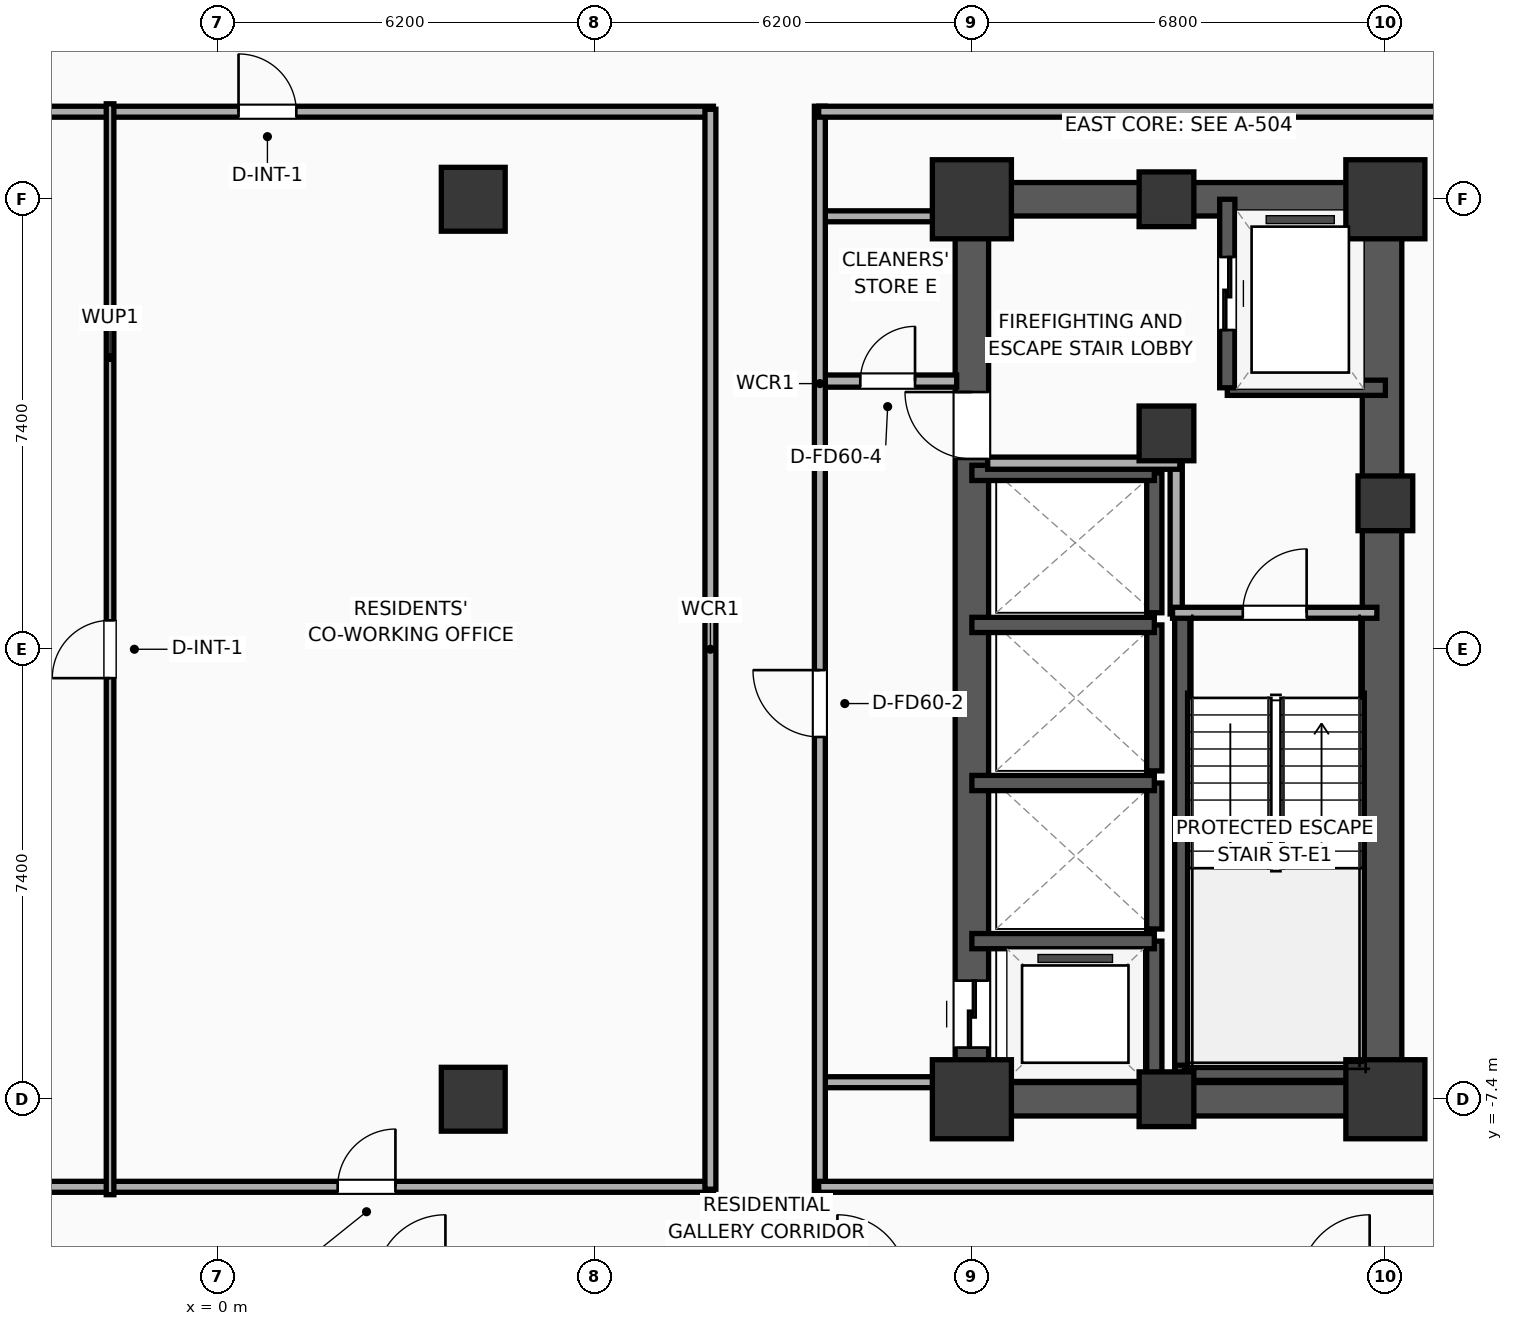
"""IFC4 building model, lengths in metres.
Left out: names, types, materials, properties, quantities, classifications, styles, units other than length and angle.
Written with IfcOpenShell. Run it as: python <this file> out.ifc"""

import sys

from ifc_helpers import new_model, si_unit, direction, frame, frame_2d, origin, origin_2d, place, context, subcontext, project, spatial, rectangle, extrude, element, fill, save


model = new_model("IFC4")
c1 = context("Model", 3, precision=1e-05, world=origin(), true_north=direction((0.0, 1.0)))
c2 = subcontext(c1, "Body", "Model", "MODEL_VIEW")
j1 = project(units=[si_unit("LENGTHUNIT", "METRE"), si_unit("PLANEANGLEUNIT", "RADIAN")], contexts=[c1])
p1 = place(None, origin())
s1 = spatial("IfcSite", under=j1, at=p1, CompositionType="ELEMENT")
p2 = place(p1, origin())
s2 = spatial("IfcBuilding", under=s1, at=p2, CompositionType="ELEMENT")
p3 = place(p2, frame((0.0, 0.0, 93.6)))
s3 = spatial("IfcBuildingStorey", under=s2, at=p3, CompositionType="ELEMENT", Elevation=93.6)
p4 = place(p3, frame((12.4, -7.4, 0.0), z_axis=(0.0, 0.0, 1.0), x_axis=(1.0, 0.0, 0.0)))
e1 = element("IfcColumn", 1, at=p4, inside=s3, PredefinedType="COLUMN", context=c2, shape_type="SweptSolid", body=[
    extrude(rectangle(XDim=1.3, YDim=1.3, at=origin_2d()), origin(), (0.0, 0.0, 1.0), 3.9),
])
p5 = place(p3, frame((15.6, 3.55, 0.0), z_axis=(0.0, 0.0, 1.0), x_axis=(1.0, 0.0, 0.0)))
e2 = element("IfcColumn", 2, at=p5, inside=s3, PredefinedType="COLUMN", context=c2, shape_type="SweptSolid", body=[
    extrude(rectangle(XDim=0.9, YDim=0.9, at=origin_2d()), origin(), (0.0, 0.0, 1.0), 3.9),
])
p6 = place(p3, frame((12.4, 7.4, 0.0), z_axis=(0.0, 0.0, 1.0), x_axis=(1.0, 0.0, 0.0)))
e3 = element("IfcColumn", 3, at=p6, inside=s3, PredefinedType="COLUMN", context=c2, shape_type="SweptSolid", body=[
    extrude(rectangle(XDim=1.3, YDim=1.3, at=origin_2d()), origin(), (0.0, 0.0, 1.0), 3.9),
])
for number, where, z_axis, x_axis in (
    (4, (15.6, -7.4, 0.0), (0.0, 0.0, 1.0), (1.0, 0.0, 0.0)),
    (5, (15.6, 7.4, 0.0), (0.0, 0.0, 1.0), (1.0, 0.0, 0.0)),
):
    element("IfcColumn", number, at=place(p3, frame(where, z_axis=z_axis, x_axis=x_axis)), inside=s3, PredefinedType="COLUMN", context=c2, shape_type="SweptSolid", body=[
        extrude(rectangle(XDim=0.9, YDim=0.9, at=origin_2d()), origin(), (0.0, 0.0, 1.0), 3.9),
    ])
p7 = place(p3, frame((19.2, -7.4, 0.0), z_axis=(0.0, 0.0, 1.0), x_axis=(1.0, 0.0, 0.0)))
e6 = element("IfcColumn", 6, at=p7, inside=s3, PredefinedType="COLUMN", context=c2, shape_type="SweptSolid", body=[
    extrude(rectangle(XDim=1.3, YDim=1.3, at=origin_2d()), origin(), (0.0, 0.0, 1.0), 3.9),
])
p8 = place(p3, frame((19.2, 2.4, 0.0), z_axis=(0.0, 0.0, 1.0), x_axis=(1.0, 0.0, 0.0)))
e7 = element("IfcColumn", 7, at=p8, inside=s3, PredefinedType="COLUMN", context=c2, shape_type="SweptSolid", body=[
    extrude(rectangle(XDim=0.9, YDim=0.9, at=origin_2d()), origin(), (0.0, 0.0, 1.0), 3.9),
])
p9 = place(p3, frame((19.2, 7.4, 0.0), z_axis=(0.0, 0.0, 1.0), x_axis=(1.0, 0.0, 0.0)))
e8 = element("IfcColumn", 8, at=p9, inside=s3, PredefinedType="COLUMN", context=c2, shape_type="SweptSolid", body=[
    extrude(rectangle(XDim=1.3, YDim=1.3, at=origin_2d()), origin(), (0.0, 0.0, 1.0), 3.9),
])
for number, where, z_axis, x_axis in (
    (9, (12.125, -7.4, 0.0), (0.0, 0.0, 1.0), (1.0, 0.0, 0.0)),
    (10, (12.125, 7.4, 0.0), (0.0, 0.0, 1.0), (1.0, 0.0, 0.0)),
):
    element("IfcWall", number, at=place(p3, frame(where, z_axis=z_axis, x_axis=x_axis)), inside=s3, PredefinedType="SHEAR", context=c2, shape_type="SweptSolid", body=[
        extrude(rectangle(XDim=7.35, YDim=0.55, at=frame_2d((3.675, 0.0))), origin(), (0.0, 0.0, 1.0), 3.65),
    ])
p10 = place(p3, frame((12.4, -7.4, 0.0), z_axis=(0.0, 0.0, 1.0), x_axis=(0.0, 1.0, 0.0)))
e11 = element("IfcWall", 11, at=p10, inside=s3, PredefinedType="SHEAR", context=c2, shape_type="SweptSolid", body=[
    extrude(rectangle(XDim=14.8, YDim=0.55, at=frame_2d((7.4, 0.0))), origin(), (0.0, 0.0, 1.0), 3.65),
])
p11 = place(p10, frame((0.85, 0.0, 0.0)))
e12 = element("IfcOpeningElement", 12, at=p11, cuts=e11, PredefinedType="OPENING", context=c2, shape_type="SweptSolid", body=[
    extrude(rectangle(XDim=1.1, YDim=2.05, at=frame_2d((0.55, 1.025))), frame((0.0, 0.285, 0.0), z_axis=(0.0, -1.0, 0.0), x_axis=(1.0, 0.0, 0.0)), (0.0, 0.0, 1.0), 0.57),
])
p12 = place(p10, frame((10.53, 0.0, 0.0)))
e13 = element("IfcOpeningElement", 13, at=p12, cuts=e11, PredefinedType="OPENING", context=c2, shape_type="SweptSolid", body=[
    extrude(rectangle(XDim=1.1, YDim=2.05, at=frame_2d((0.55, 1.025))), frame((0.0, 0.285, 0.0), z_axis=(0.0, -1.0, 0.0), x_axis=(1.0, 0.0, 0.0)), (0.0, 0.0, 1.0), 0.57),
])
p13 = place(p3, frame((19.145, -7.4, 0.0), z_axis=(0.0, 0.0, 1.0), x_axis=(0.0, 1.0, 0.0)))
e14 = element("IfcWall", 14, at=p13, inside=s3, PredefinedType="SHEAR", context=c2, shape_type="SweptSolid", body=[
    extrude(rectangle(XDim=14.8, YDim=0.65, at=frame_2d((7.4, 0.0))), origin(), (0.0, 0.0, 1.0), 3.65),
])
p14 = place(p3, frame((15.86, -7.085, 0.0), z_axis=(0.0, 0.0, 1.0), x_axis=(0.0, 1.0, 0.0)))
e15 = element("IfcWall", 15, at=p14, inside=s3, PredefinedType="SOLIDWALL", context=c2, shape_type="SweptSolid", body=[
    extrude(rectangle(XDim=7.685, YDim=0.25, at=frame_2d((3.843, 0.0))), origin(), (0.0, 0.0, 1.0), 3.65),
])
p15 = place(p3, frame((15.74, -6.965, 0.0), z_axis=(0.0, 0.0, 1.0), x_axis=(1.0, 0.0, 0.0)))
e16 = element("IfcWall", 16, at=p15, inside=s3, PredefinedType="SOLIDWALL", context=c2, shape_type="SweptSolid", body=[
    extrude(rectangle(XDim=3.46, YDim=0.25, at=frame_2d((1.73, 0.0))), origin(), (0.0, 0.0, 1.0), 3.65),
])
for number, where, z_axis, x_axis in (
    (17, (4.2, -7.4, 0.0), (0.0, 0.0, 1.0), (1.0, 0.0, 0.0)),
    (18, (4.2, 7.4, 0.0), (0.0, 0.0, 1.0), (1.0, 0.0, 0.0)),
):
    element("IfcColumn", number, at=place(p3, frame(where, z_axis=z_axis, x_axis=x_axis)), inside=s3, PredefinedType="COLUMN", context=c2, shape_type="SweptSolid", body=[
        extrude(rectangle(XDim=1.05, YDim=1.05, at=origin_2d()), origin(), (0.0, 0.0, 1.0), 3.9),
    ])
p16 = place(p3, frame((16.6, 4.3, 0.0), z_axis=(0.0, 0.0, 1.0), x_axis=(1.0, 0.0, 0.0)))
e19 = element("IfcWall", 19, at=p16, inside=s3, PredefinedType="SOLIDWALL", context=c2, shape_type="SweptSolid", body=[
    extrude(rectangle(XDim=2.6, YDim=0.25, at=frame_2d((1.3, 0.0))), origin(), (0.0, 0.0, 1.0), 3.65),
])
p17 = place(p3, frame((16.6, 7.4, 0.0), z_axis=(0.0, 0.0, 1.0), x_axis=(0.0, -1.0, 0.0)))
e20 = element("IfcWall", 20, at=p17, inside=s3, PredefinedType="SOLIDWALL", context=c2, shape_type="SweptSolid", body=[
    extrude(rectangle(XDim=3.1, YDim=0.25, at=frame_2d((1.55, 0.0))), origin(), (0.0, 0.0, 1.0), 3.65),
])
p18 = place(p17, frame((0.95, 0.0, 0.0)))
e21 = element("IfcOpeningElement", 21, at=p18, cuts=e20, PredefinedType="OPENING", context=c2, shape_type="SweptSolid", body=[
    extrude(rectangle(XDim=1.2, YDim=2.05, at=frame_2d((0.6, 1.025))), frame((0.0, 0.135, 0.0), z_axis=(0.0, -1.0, 0.0), x_axis=(1.0, 0.0, 0.0)), (0.0, 0.0, 1.0), 0.27),
])
p19 = place(p3, frame((15.4, -7.4, 0.0), z_axis=(0.0, 0.0, 1.0), x_axis=(0.0, 1.0, 0.0)))
e22 = element("IfcWall", 22, at=p19, inside=s3, PredefinedType="SOLIDWALL", context=c2, shape_type="SweptSolid", body=[
    extrude(rectangle(XDim=2.6, YDim=0.25, at=frame_2d((1.3, 0.0))), origin(), (0.0, 0.0, 1.0), 3.65),
])
p20 = place(p3, frame((15.4, -4.8, 0.0), z_axis=(0.0, 0.0, 1.0), x_axis=(-1.0, 0.0, 0.0)))
e23 = element("IfcWall", 23, at=p20, inside=s3, PredefinedType="SOLIDWALL", context=c2, shape_type="SweptSolid", body=[
    extrude(rectangle(XDim=3.0, YDim=0.25, at=frame_2d((1.5, 0.0))), origin(), (0.0, 0.0, 1.0), 3.65),
])
p21 = place(p3, frame((15.4, -4.6, 0.0), z_axis=(0.0, 0.0, 1.0), x_axis=(0.0, 1.0, 0.0)))
e24 = element("IfcWall", 24, at=p21, inside=s3, PredefinedType="SOLIDWALL", context=c2, shape_type="SweptSolid", body=[
    extrude(rectangle(XDim=2.4, YDim=0.25, at=frame_2d((1.2, 0.0))), origin(), (0.0, 0.0, 1.0), 3.65),
])
p22 = place(p3, frame((15.4, -2.2, 0.0), z_axis=(0.0, 0.0, 1.0), x_axis=(-1.0, 0.0, 0.0)))
e25 = element("IfcWall", 25, at=p22, inside=s3, PredefinedType="SOLIDWALL", context=c2, shape_type="SweptSolid", body=[
    extrude(rectangle(XDim=3.0, YDim=0.25, at=frame_2d((1.5, 0.0))), origin(), (0.0, 0.0, 1.0), 3.65),
])
p23 = place(p3, frame((15.4, -2.0, 0.0), z_axis=(0.0, 0.0, 1.0), x_axis=(0.0, 1.0, 0.0)))
e26 = element("IfcWall", 26, at=p23, inside=s3, PredefinedType="SOLIDWALL", context=c2, shape_type="SweptSolid", body=[
    extrude(rectangle(XDim=2.4, YDim=0.25, at=frame_2d((1.2, 0.0))), origin(), (0.0, 0.0, 1.0), 3.65),
])
p24 = place(p3, frame((15.4, 0.4, 0.0), z_axis=(0.0, 0.0, 1.0), x_axis=(-1.0, 0.0, 0.0)))
e27 = element("IfcWall", 27, at=p24, inside=s3, PredefinedType="SOLIDWALL", context=c2, shape_type="SweptSolid", body=[
    extrude(rectangle(XDim=3.0, YDim=0.25, at=frame_2d((1.5, 0.0))), origin(), (0.0, 0.0, 1.0), 3.65),
])
p25 = place(p3, frame((15.4, 0.6, 0.0), z_axis=(0.0, 0.0, 1.0), x_axis=(0.0, 1.0, 0.0)))
e28 = element("IfcWall", 28, at=p25, inside=s3, PredefinedType="SOLIDWALL", context=c2, shape_type="SweptSolid", body=[
    extrude(rectangle(XDim=2.3, YDim=0.25, at=frame_2d((1.15, 0.0))), origin(), (0.0, 0.0, 1.0), 3.65),
])
p26 = place(p3, frame((15.4, 2.9, 0.0), z_axis=(0.0, 0.0, 1.0), x_axis=(-1.0, 0.0, 0.0)))
e29 = element("IfcWall", 29, at=p26, inside=s3, PredefinedType="SOLIDWALL", context=c2, shape_type="SweptSolid", body=[
    extrude(rectangle(XDim=3.0, YDim=0.25, at=frame_2d((1.5, 0.0))), origin(), (0.0, 0.0, 1.0), 3.65),
])
p27 = place(p3, frame((15.76, 0.58, 0.0), z_axis=(0.0, 0.0, 1.0), x_axis=(0.0, 1.0, 0.0)))
e30 = element("IfcWall", 30, at=p27, inside=s3, PredefinedType="PARTITIONING", context=c2, shape_type="SweptSolid", body=[
    extrude(rectangle(XDim=2.52, YDim=0.2, at=frame_2d((1.26, 0.0))), origin(), (0.0, 0.0, 1.0), 3.65),
])
p28 = place(p3, frame((12.66, 3.06, 0.0), z_axis=(0.0, 0.0, 1.0), x_axis=(1.0, 0.0, 0.0)))
e31 = element("IfcWall", 31, at=p28, inside=s3, PredefinedType="PARTITIONING", context=c2, shape_type="SweptSolid", body=[
    extrude(rectangle(XDim=3.16, YDim=0.2, at=frame_2d((1.58, 0.0))), origin(), (0.0, 0.0, 1.0), 3.65),
])
p29 = place(p3, frame((15.7, 0.6, 0.0), z_axis=(0.0, 0.0, 1.0), x_axis=(1.0, 0.0, 0.0)))
e32 = element("IfcWall", 32, at=p29, inside=s3, PredefinedType="PARTITIONING", context=c2, shape_type="SweptSolid", body=[
    extrude(rectangle(XDim=3.36, YDim=0.18, at=frame_2d((1.68, 0.0))), origin(), (0.0, 0.0, 1.0), 3.65),
])
p30 = place(p29, frame((1.155, 0.0, 0.0)))
e33 = element("IfcOpeningElement", 33, at=p30, cuts=e32, PredefinedType="OPENING", context=c2, shape_type="SweptSolid", body=[
    extrude(rectangle(XDim=1.05, YDim=2.05, at=frame_2d((0.525, 1.025))), frame((0.0, 0.1, 0.0), z_axis=(0.0, -1.0, 0.0), x_axis=(1.0, 0.0, 0.0)), (0.0, 0.0, 1.0), 0.2),
])
p31 = place(p3, frame((9.88, 4.41, 0.0), z_axis=(0.0, 0.0, 1.0), x_axis=(1.0, 0.0, 0.0)))
e34 = element("IfcWall", 34, at=p31, inside=s3, PredefinedType="PARTITIONING", context=c2, shape_type="SweptSolid", body=[
    extrude(rectangle(XDim=2.27, YDim=0.2, at=frame_2d((1.135, 0.0))), origin(), (0.0, 0.0, 1.0), 3.65),
])
p32 = place(p31, frame((0.685, 0.0, 0.0)))
e35 = element("IfcOpeningElement", 35, at=p32, cuts=e34, PredefinedType="OPENING", context=c2, shape_type="SweptSolid", body=[
    extrude(rectangle(XDim=0.9, YDim=2.05, at=frame_2d((0.45, 1.025))), frame((0.0, 0.11, 0.0), z_axis=(0.0, -1.0, 0.0), x_axis=(1.0, 0.0, 0.0)), (0.0, 0.0, 1.0), 0.22),
])
for number, where, z_axis, x_axis in (
    (36, (9.88, 7.12, 0.0), (0.0, 0.0, 1.0), (1.0, 0.0, 0.0)),
    (37, (9.88, -7.12, 0.0), (0.0, 0.0, 1.0), (1.0, 0.0, 0.0)),
):
    element("IfcWall", number, at=place(p3, frame(where, z_axis=z_axis, x_axis=x_axis)), inside=s3, PredefinedType="PARTITIONING", context=c2, shape_type="SweptSolid", body=[
        extrude(rectangle(XDim=2.27, YDim=0.18, at=frame_2d((1.135, 0.0))), origin(), (0.0, 0.0, 1.0), 3.65),
    ])
p33 = place(p3, frame((9.9, -8.93, 0.0), z_axis=(0.0, 0.0, 1.0), x_axis=(0.0, 1.0, 0.0)))
e38 = element("IfcWall", 38, at=p33, inside=s3, PredefinedType="PARTITIONING", context=c2, shape_type="SweptSolid", body=[
    extrude(rectangle(XDim=17.86, YDim=0.18, at=frame_2d((8.93, 0.0))), origin(), (0.0, 0.0, 1.0), 3.65),
])
p34 = place(p33, frame((7.487, 0.0, 0.0)))
e39 = element("IfcOpeningElement", 39, at=p34, cuts=e38, PredefinedType="OPENING", context=c2, shape_type="SweptSolid", body=[
    extrude(rectangle(XDim=1.1, YDim=2.05, at=frame_2d((0.55, 1.025))), frame((0.0, 0.1, 0.0), z_axis=(0.0, -1.0, 0.0), x_axis=(1.0, 0.0, 0.0)), (0.0, 0.0, 1.0), 0.2),
])
p35 = place(p3, frame((9.88, 8.84, 0.0), z_axis=(0.0, 0.0, 1.0), x_axis=(1.0, 0.0, 0.0)))
e40 = element("IfcWall", 40, at=p35, inside=s3, PredefinedType="PARTITIONING", context=c2, shape_type="SweptSolid", body=[
    extrude(rectangle(XDim=23.33, YDim=0.18, at=frame_2d((11.665, 0.0))), origin(), (0.0, 0.0, 1.0), 3.65),
])
p36 = place(p35, frame((17.366, 0.0, 0.0)))
e41 = element("IfcOpeningElement", 41, at=p36, cuts=e40, PredefinedType="OPENING", context=c2, shape_type="SweptSolid", body=[
    extrude(rectangle(XDim=1.15, YDim=2.05, at=frame_2d((0.575, 1.025))), frame((0.0, 0.1, 0.0), z_axis=(0.0, -1.0, 0.0), x_axis=(1.0, 0.0, 0.0)), (0.0, 0.0, 1.0), 0.2),
])
p37 = place(p3, frame((9.88, -8.84, 0.0), z_axis=(0.0, 0.0, 1.0), x_axis=(1.0, 0.0, 0.0)))
e42 = element("IfcWall", 42, at=p37, inside=s3, PredefinedType="PARTITIONING", context=c2, shape_type="SweptSolid", body=[
    extrude(rectangle(XDim=23.33, YDim=0.18, at=frame_2d((11.665, 0.0))), origin(), (0.0, 0.0, 1.0), 3.65),
])
p38 = place(p3, frame((-8.15, 8.84, 0.0), z_axis=(0.0, 0.0, 1.0), x_axis=(1.0, 0.0, 0.0)))
e43 = element("IfcWall", 43, at=p38, inside=s3, PredefinedType="PARTITIONING", context=c2, shape_type="SweptSolid", body=[
    extrude(rectangle(XDim=16.3, YDim=0.18, at=frame_2d((8.15, 0.0))), origin(), (0.0, 0.0, 1.0), 3.65),
])
p39 = place(p38, frame((8.49, 0.0, 0.0)))
e44 = element("IfcOpeningElement", 44, at=p39, cuts=e43, PredefinedType="OPENING", context=c2, shape_type="SweptSolid", body=[
    extrude(rectangle(XDim=0.95, YDim=2.05, at=frame_2d((0.475, 1.025))), frame((0.0, 0.1, 0.0), z_axis=(0.0, -1.0, 0.0), x_axis=(1.0, 0.0, 0.0)), (0.0, 0.0, 1.0), 0.2),
])
p40 = place(p3, frame((-8.15, -8.84, 0.0), z_axis=(0.0, 0.0, 1.0), x_axis=(1.0, 0.0, 0.0)))
e45 = element("IfcWall", 45, at=p40, inside=s3, PredefinedType="PARTITIONING", context=c2, shape_type="SweptSolid", body=[
    extrude(rectangle(XDim=16.3, YDim=0.18, at=frame_2d((8.15, 0.0))), origin(), (0.0, 0.0, 1.0), 3.65),
])
p41 = place(p40, frame((1.13, 0.0, 0.0)))
e46 = element("IfcOpeningElement", 46, at=p41, cuts=e45, PredefinedType="OPENING", context=c2, shape_type="SweptSolid", body=[
    extrude(rectangle(XDim=1.0, YDim=2.05, at=frame_2d((0.5, 1.025))), frame((0.0, 0.1, 0.0), z_axis=(0.0, -1.0, 0.0), x_axis=(1.0, 0.0, 0.0)), (0.0, 0.0, 1.0), 0.2),
])
p42 = place(p40, frame((10.12, 0.0, 0.0)))
e47 = element("IfcOpeningElement", 47, at=p42, cuts=e45, PredefinedType="OPENING", context=c2, shape_type="SweptSolid", body=[
    extrude(rectangle(XDim=0.95, YDim=2.05, at=frame_2d((0.475, 1.025))), frame((0.0, 0.1, 0.0), z_axis=(0.0, -1.0, 0.0), x_axis=(1.0, 0.0, 0.0)), (0.0, 0.0, 1.0), 0.2),
])
p43 = place(p3, frame((8.1, -8.88, 0.0), z_axis=(0.0, 0.0, 1.0), x_axis=(0.0, 1.0, 0.0)))
e48 = element("IfcWall", 48, at=p43, inside=s3, PredefinedType="PARTITIONING", context=c2, shape_type="SweptSolid", body=[
    extrude(rectangle(XDim=17.76, YDim=0.18, at=frame_2d((8.88, 0.0))), origin(), (0.0, 0.0, 1.0), 3.65),
])
p44 = place(p3, frame((-1.773, -8.97, 0.0), z_axis=(0.0, 0.0, 1.0), x_axis=(0.0, 1.0, 0.0)))
e49 = element("IfcWall", 49, at=p44, inside=s3, PredefinedType="PARTITIONING", context=c2, shape_type="SweptSolid", body=[
    extrude(rectangle(XDim=17.94, YDim=0.125, at=frame_2d((8.97, 0.0))), origin(), (0.0, 0.0, 1.0), 3.65),
])
p45 = place(p44, frame((8.495, 0.0, 0.0)))
e50 = element("IfcOpeningElement", 50, at=p45, cuts=e49, PredefinedType="OPENING", context=c2, shape_type="SweptSolid", body=[
    extrude(rectangle(XDim=0.95, YDim=2.05, at=frame_2d((0.475, 1.025))), frame((0.0, 0.073, 0.0), z_axis=(0.0, -1.0, 0.0), x_axis=(1.0, 0.0, 0.0)), (0.0, 0.0, 1.0), 0.145),
])
p46 = place(p18, origin())
e51 = element("IfcDoor", 51, at=p46, inside=s3, OperationType="SLIDING_TO_LEFT", PredefinedType="DOOR", context=c2, shape_type="SweptSolid", body=[
    extrude(rectangle(XDim=1.2, YDim=2.05, at=frame_2d((0.6, 1.025))), frame((0.0, 0.025, 0.0), z_axis=(0.0, -1.0, 0.0), x_axis=(1.0, 0.0, 0.0)), (0.0, 0.0, 1.0), 0.05),
])
fill(e21, e51)
p47 = place(p11, origin())
e52 = element("IfcDoor", 52, at=p47, inside=s3, OperationType="SLIDING_TO_LEFT", PredefinedType="DOOR", context=c2, shape_type="SweptSolid", body=[
    extrude(rectangle(XDim=1.1, YDim=2.05, at=frame_2d((0.55, 1.025))), frame((0.0, 0.025, 0.0), z_axis=(0.0, -1.0, 0.0), x_axis=(1.0, 0.0, 0.0)), (0.0, 0.0, 1.0), 0.05),
])
fill(e12, e52)
p48 = place(p30, origin())
e53 = element("IfcDoor", 53, at=p48, inside=s3, OperationType="SINGLE_SWING_RIGHT", PredefinedType="DOOR", context=c2, shape_type="SweptSolid", body=[
    extrude(rectangle(XDim=1.05, YDim=2.05, at=frame_2d((0.525, 1.025))), frame((0.0, 0.025, 0.0), z_axis=(0.0, -1.0, 0.0), x_axis=(1.0, 0.0, 0.0)), (0.0, 0.0, 1.0), 0.05),
])
fill(e33, e53)
p49 = place(p32, origin())
e54 = element("IfcDoor", 54, at=p49, inside=s3, OperationType="SINGLE_SWING_RIGHT", PredefinedType="DOOR", context=c2, shape_type="SweptSolid", body=[
    extrude(rectangle(XDim=0.9, YDim=2.05, at=frame_2d((0.45, 1.025))), frame((0.0, 0.025, 0.0), z_axis=(0.0, -1.0, 0.0), x_axis=(1.0, 0.0, 0.0)), (0.0, 0.0, 1.0), 0.05),
])
fill(e35, e54)
p50 = place(p34, origin())
e55 = element("IfcDoor", 55, at=p50, inside=s3, OperationType="SINGLE_SWING_RIGHT", PredefinedType="DOOR", context=c2, shape_type="SweptSolid", body=[
    extrude(rectangle(XDim=1.1, YDim=2.05, at=frame_2d((0.55, 1.025))), frame((0.0, 0.025, 0.0), z_axis=(0.0, -1.0, 0.0), x_axis=(1.0, 0.0, 0.0)), (0.0, 0.0, 1.0), 0.05),
])
fill(e39, e55)
p51 = place(p39, origin())
e56 = element("IfcDoor", 56, at=p51, inside=s3, OperationType="SINGLE_SWING_LEFT", PredefinedType="DOOR", context=c2, shape_type="SweptSolid", body=[
    extrude(rectangle(XDim=0.95, YDim=2.05, at=frame_2d((0.475, 1.025))), frame((0.0, 0.025, 0.0), z_axis=(0.0, -1.0, 0.0), x_axis=(1.0, 0.0, 0.0)), (0.0, 0.0, 1.0), 0.05),
])
fill(e44, e56)
p52 = place(p42, origin())
e57 = element("IfcDoor", 57, at=p52, inside=s3, OperationType="SINGLE_SWING_RIGHT", PredefinedType="DOOR", context=c2, shape_type="SweptSolid", body=[
    extrude(rectangle(XDim=0.95, YDim=2.05, at=frame_2d((0.475, 1.025))), frame((0.0, 0.025, 0.0), z_axis=(0.0, -1.0, 0.0), x_axis=(1.0, 0.0, 0.0)), (0.0, 0.0, 1.0), 0.05),
])
fill(e47, e57)
p53 = place(p45, origin())
e58 = element("IfcDoor", 58, at=p53, inside=s3, OperationType="SINGLE_SWING_LEFT", PredefinedType="DOOR", context=c2, shape_type="SweptSolid", body=[
    extrude(rectangle(XDim=0.95, YDim=2.05, at=frame_2d((0.475, 1.025))), frame((0.0, 0.025, 0.0), z_axis=(0.0, -1.0, 0.0), x_axis=(1.0, 0.0, 0.0)), (0.0, 0.0, 1.0), 0.05),
])
fill(e50, e58)
p54 = place(p12, origin())
e59 = element("IfcDoor", 59, at=p54, inside=s3, OperationType="SINGLE_SWING_RIGHT", PredefinedType="DOOR", context=c2, shape_type="SweptSolid", body=[
    extrude(rectangle(XDim=1.1, YDim=2.05, at=frame_2d((0.55, 1.025))), frame((0.0, 0.025, 0.0), z_axis=(0.0, -1.0, 0.0), x_axis=(1.0, 0.0, 0.0)), (0.0, 0.0, 1.0), 0.05),
])
fill(e13, e59)
save(model, sys.argv[1])
